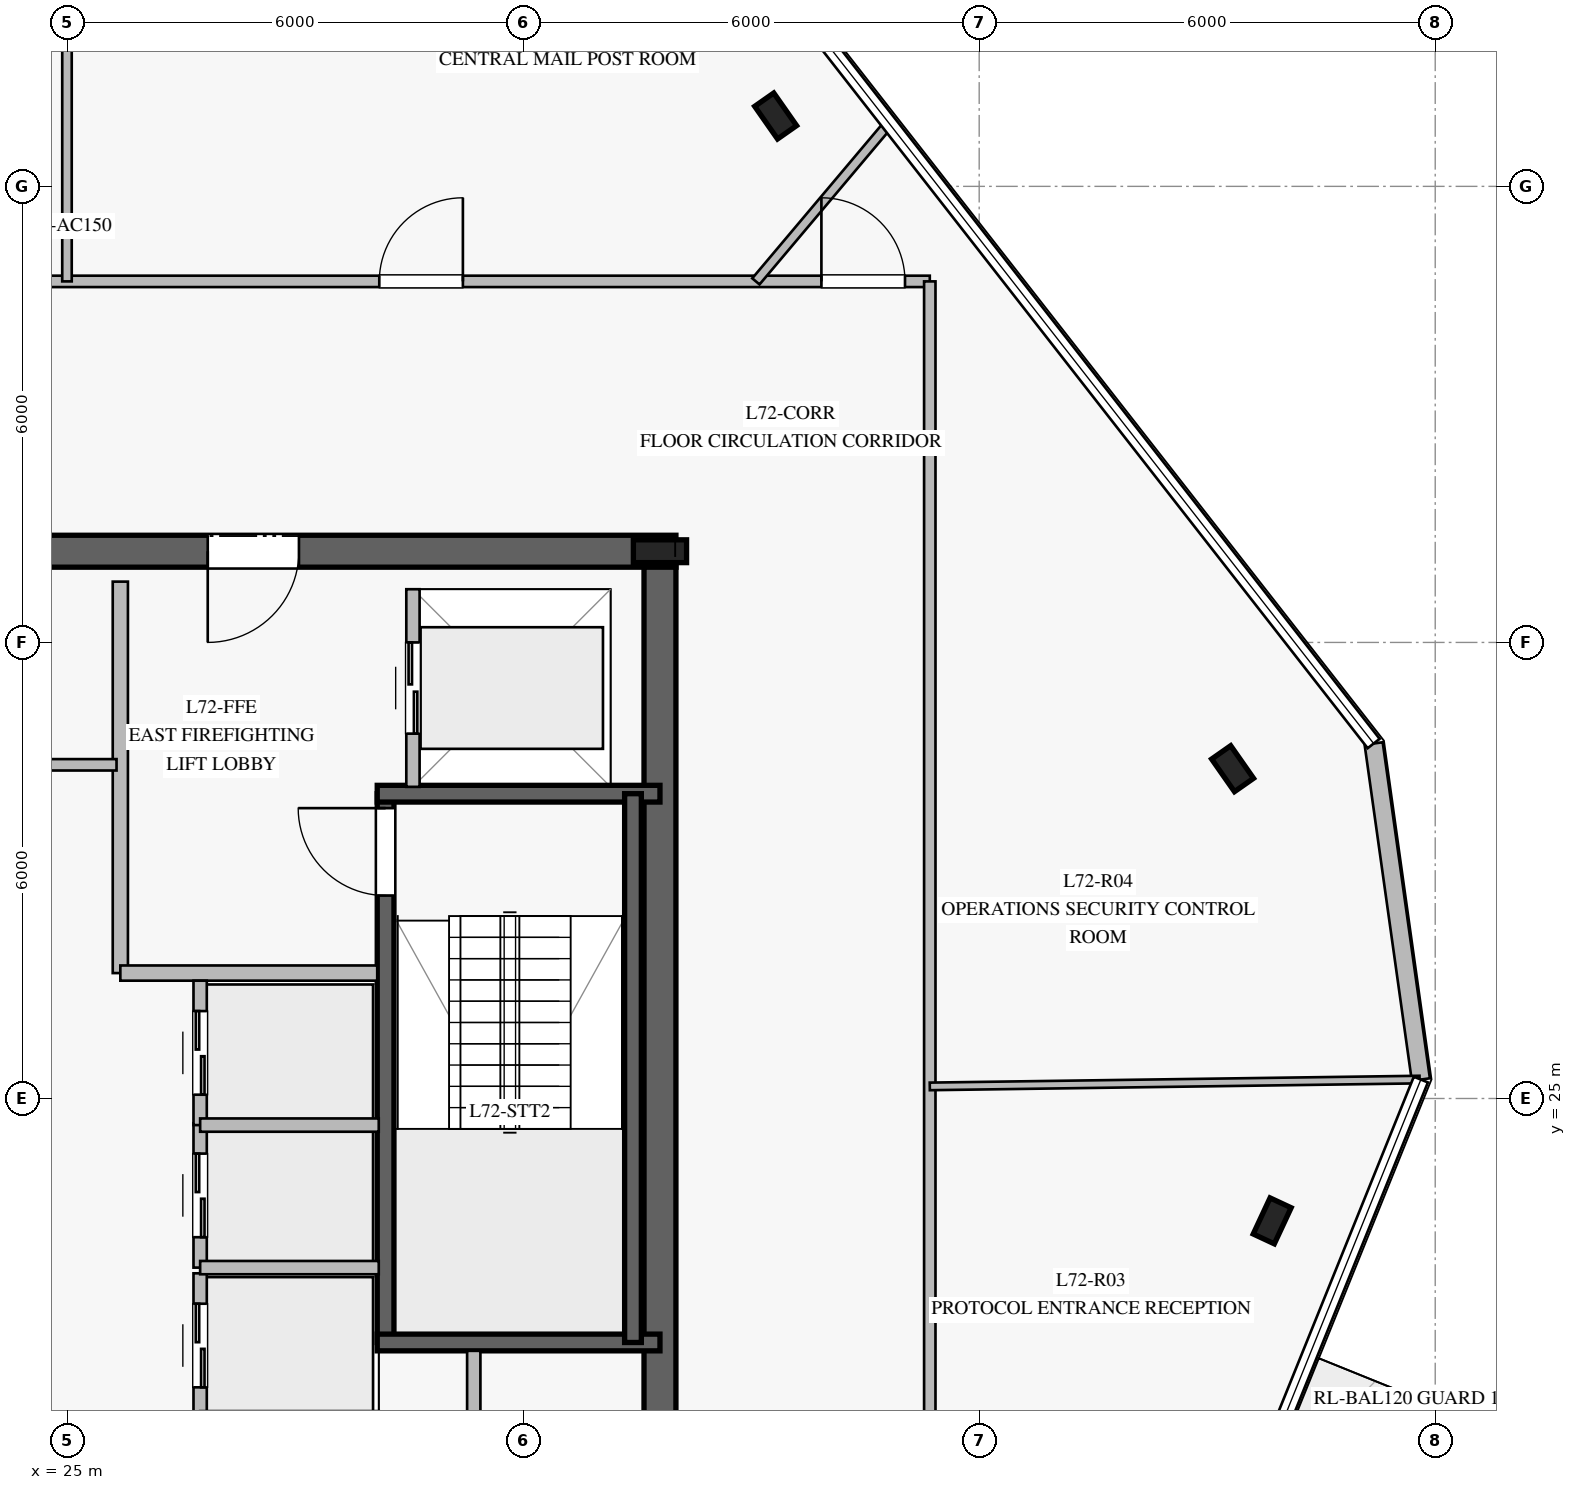
"""IFC4 building model, lengths in metres.
Left out: names, types, materials, properties, quantities, classifications, styles, units other than length and angle.
Written with IfcOpenShell. Run it as: python <this file> out.ifc"""

import sys

from ifc_helpers import new_model, si_unit, direction, frame, frame_2d, origin, origin_2d, place, context, subcontext, project, spatial, rectangle, i_section, extrude, element, fill, save


model = new_model("IFC4")
c1 = context("Model", 3, precision=1e-05, world=origin(), true_north=direction((0.0, 1.0)))
c2 = subcontext(c1, "Body", "Model", "MODEL_VIEW")
j1 = project(units=[si_unit("LENGTHUNIT", "METRE"), si_unit("PLANEANGLEUNIT", "RADIAN")], contexts=[c1])
p1 = place(None, origin())
s1 = spatial("IfcSite", under=j1, at=p1, CompositionType="ELEMENT")
p2 = place(p1, origin())
s2 = spatial("IfcBuilding", under=s1, at=p2, CompositionType="ELEMENT")
p3 = place(p2, frame((0.0, 0.0, 298.2)))
s3 = spatial("IfcBuildingStorey", under=s2, at=p3, CompositionType="ELEMENT", Elevation=298.2)
p4 = place(p3, frame((33.01, 32.2, 0.0), z_axis=(0.0, 0.0, 1.0), x_axis=(-1.0, 0.0, 0.0)))
e1 = element("IfcWall", 1, at=p4, inside=s3, PredefinedType="SHEAR", context=c2, shape_type="SweptSolid", body=[
    extrude(rectangle(XDim=16.02, YDim=0.42, at=frame_2d((8.01, 0.0))), origin(), (0.0, 0.0, 1.0), 3.78),
])
p5 = place(p4, frame((4.96, 0.0, 0.0)))
e2 = element("IfcOpeningElement", 2, at=p5, cuts=e1, PredefinedType="OPENING", context=c2, shape_type="SweptSolid", body=[
    extrude(rectangle(XDim=1.2, YDim=2.25, at=frame_2d((0.6, 1.125))), frame((0.0, 0.22, 0.0), z_axis=(0.0, -1.0, 0.0), x_axis=(1.0, 0.0, 0.0)), (0.0, 0.0, 1.0), 0.44),
])
p6 = place(p4, frame((9.785, 0.0, 0.0)))
e3 = element("IfcOpeningElement", 3, at=p6, cuts=e1, PredefinedType="OPENING", context=c2, shape_type="SweptSolid", body=[
    extrude(rectangle(XDim=1.1, YDim=2.2, at=frame_2d((0.55, 1.1))), frame((0.0, 0.22, 0.0), z_axis=(0.0, -1.0, 0.0), x_axis=(1.0, 0.0, 0.0)), (0.0, 0.0, 1.0), 0.44),
])
p7 = place(p3, frame((32.8, 18.01, 0.0), z_axis=(0.0, 0.0, 1.0), x_axis=(0.0, 1.0, 0.0)))
e4 = element("IfcWall", 4, at=p7, inside=s3, PredefinedType="SHEAR", context=c2, shape_type="SweptSolid", body=[
    extrude(rectangle(XDim=13.98, YDim=0.42, at=frame_2d((6.99, 0.0))), origin(), (0.0, 0.0, 1.0), 3.78),
])
p8 = place(p3, frame((32.8, 32.2, 0.0), z_axis=(0.0, 0.0, 1.0), x_axis=(1.0, 0.0, 0.0)))
e5 = element("IfcColumn", 5, at=p8, inside=s3, PredefinedType="COLUMN", context=c2, shape_type="SweptSolid", body=[
    extrude(i_section(OverallWidth=0.3, OverallDepth=0.7, WebThickness=0.017, FlangeThickness=0.032, at=origin_2d()), origin(), (0.0, 0.0, 1.0), 4.0),
])
p9 = place(p3, frame((29.19, 21.79, 0.0), z_axis=(0.0, 0.0, 1.0), x_axis=(0.0, 1.0, 0.0)))
e6 = element("IfcWall", 6, at=p9, inside=s3, PredefinedType="SOLIDWALL", context=c2, shape_type="SweptSolid", body=[
    extrude(rectangle(XDim=7.22, YDim=0.22, at=frame_2d((3.61, 0.0))), origin(), (0.0, 0.0, 1.0), 3.78),
])
p10 = place(p9, frame((5.88, 0.0, 0.0)))
e7 = element("IfcOpeningElement", 7, at=p10, cuts=e6, PredefinedType="OPENING", context=c2, shape_type="SweptSolid", body=[
    extrude(rectangle(XDim=1.15, YDim=2.2, at=frame_2d((0.575, 1.1))), frame((0.0, 0.12, 0.0), z_axis=(0.0, -1.0, 0.0), x_axis=(1.0, 0.0, 0.0)), (0.0, 0.0, 1.0), 0.24),
])
for number, where, z_axis, x_axis in (
    (8, (29.08, 21.79, 0.0), (0.0, 0.0, 1.0), (1.0, 0.0, 0.0)),
    (9, (29.08, 29.01, 0.0), (0.0, 0.0, 1.0), (1.0, 0.0, 0.0)),
):
    element("IfcWall", number, at=place(p3, frame(where, z_axis=z_axis, x_axis=x_axis)), inside=s3, PredefinedType="SOLIDWALL", context=c2, shape_type="SweptSolid", body=[
        extrude(rectangle(XDim=3.72, YDim=0.22, at=frame_2d((1.86, 0.0))), origin(), (0.0, 0.0, 1.0), 3.78),
    ])
p11 = place(p3, frame((32.445, 29.01, 0.0), z_axis=(0.0, 0.0, 1.0), x_axis=(0.0, -1.0, 0.0)))
e10 = element("IfcWall", 10, at=p11, inside=s3, PredefinedType="SOLIDWALL", context=c2, shape_type="SweptSolid", body=[
    extrude(rectangle(XDim=7.22, YDim=0.22, at=frame_2d((3.61, 0.0))), origin(), (0.0, 0.0, 1.0), 3.78),
])
for number, where, z_axis, x_axis in (
    (11, (40.855, 23.39, 0.0), (0.0, 0.0, 1.0), (0.423, 0.906, 0.0)),
    (12, (40.334, 29.339, 0.0), (0.0, 0.0, 1.0), (-0.574, 0.819, 0.0)),
    (13, (34.322, 37.926, 0.0), (0.0, 0.0, 1.0), (-0.574, 0.819, 0.0)),
):
    element("IfcColumn", number, at=place(p3, frame(where, z_axis=z_axis, x_axis=x_axis)), inside=s3, PredefinedType="COLUMN", context=c2, shape_type="SweptSolid", body=[
        extrude(i_section(OverallWidth=0.306, OverallDepth=0.524, WebThickness=0.021, FlangeThickness=0.04, at=origin_2d()), origin(), (0.0, 0.0, 1.0), 4.0),
    ])
p12 = place(p3, frame((42.811, 25.249, 0.0), z_axis=(0.0, 0.0, 1.0), x_axis=(-0.139124115192, 0.990274952007, 0.0)))
e14 = element("IfcWall", 14, at=p12, inside=s3, PredefinedType="STANDARD", context=c2, shape_type="SweptSolid", body=[
    extrude(rectangle(XDim=4.464, YDim=0.24, at=frame_2d((2.232, 0.0))), origin(), (0.0, 0.0, 1.0), 3.78),
])
p13 = place(p3, frame((25.7, 26.65, 0.0), z_axis=(0.0, 0.0, 1.0), x_axis=(0.0, 1.0, 0.0)))
e15 = element("IfcWall", 15, at=p13, inside=s3, PredefinedType="PARTITIONING", context=c2, shape_type="SweptSolid", body=[
    extrude(rectangle(XDim=5.15, YDim=0.2, at=frame_2d((2.575, 0.0))), origin(), (0.0, 0.0, 1.0), 3.78),
])
p14 = place(p3, frame((25.7, 26.65, 0.0), z_axis=(0.0, 0.0, 1.0), x_axis=(1.0, 0.0, 0.0)))
e16 = element("IfcWall", 16, at=p14, inside=s3, PredefinedType="PARTITIONING", context=c2, shape_type="SweptSolid", body=[
    extrude(rectangle(XDim=3.38, YDim=0.2, at=frame_2d((1.69, 0.0))), origin(), (0.0, 0.0, 1.0), 3.78),
])
p15 = place(p3, frame((30.35, 18.2, 0.0), z_axis=(0.0, 0.0, 1.0), x_axis=(0.0, 1.0, 0.0)))
e17 = element("IfcWall", 17, at=p15, inside=s3, PredefinedType="PARTITIONING", context=c2, shape_type="SweptSolid", body=[
    extrude(rectangle(XDim=3.48, YDim=0.175, at=frame_2d((1.74, 0.0))), origin(), (0.0, 0.0, 1.0), 3.78),
])
p16 = place(p3, frame((19.75, 29.39, 0.0), z_axis=(0.0, 0.0, 1.0), x_axis=(1.0, 0.0, 0.0)))
e18 = element("IfcWall", 18, at=p16, inside=s3, PredefinedType="PARTITIONING", context=c2, shape_type="SweptSolid", body=[
    extrude(rectangle(XDim=5.9, YDim=0.15, at=frame_2d((2.95, 0.0))), origin(), (0.0, 0.0, 1.0), 3.78),
])
p17 = place(p3, frame((26.75, 20.8, 0.0), z_axis=(0.0, 0.0, 1.0), x_axis=(0.0, 1.0, 0.0)))
e19 = element("IfcWall", 19, at=p17, inside=s3, PredefinedType="PARTITIONING", context=c2, shape_type="SweptSolid", body=[
    extrude(rectangle(XDim=1.9, YDim=0.175, at=frame_2d((0.95, 0.0))), origin(), (0.0, 0.0, 1.0), 3.78),
])
p18 = place(p17, frame((0.4, 0.0, 0.0)))
e20 = element("IfcOpeningElement", 20, at=p18, cuts=e19, PredefinedType="OPENING", context=c2, shape_type="SweptSolid", body=[
    extrude(rectangle(XDim=1.1, YDim=2.2, at=frame_2d((0.55, 1.1))), frame((0.0, 0.098, 0.0), z_axis=(0.0, -1.0, 0.0), x_axis=(1.0, 0.0, 0.0)), (0.0, 0.0, 1.0), 0.195),
])
p19 = place(p3, frame((26.75, 22.775, 0.0), z_axis=(0.0, 0.0, 1.0), x_axis=(0.0, 1.0, 0.0)))
e21 = element("IfcWall", 21, at=p19, inside=s3, PredefinedType="PARTITIONING", context=c2, shape_type="SweptSolid", body=[
    extrude(rectangle(XDim=1.9, YDim=0.175, at=frame_2d((0.95, 0.0))), origin(), (0.0, 0.0, 1.0), 3.78),
])
p20 = place(p19, frame((0.4, 0.0, 0.0)))
e22 = element("IfcOpeningElement", 22, at=p20, cuts=e21, PredefinedType="OPENING", context=c2, shape_type="SweptSolid", body=[
    extrude(rectangle(XDim=1.1, YDim=2.2, at=frame_2d((0.55, 1.1))), frame((0.0, 0.098, 0.0), z_axis=(0.0, -1.0, 0.0), x_axis=(1.0, 0.0, 0.0)), (0.0, 0.0, 1.0), 0.195),
])
p21 = place(p3, frame((26.75, 22.775, 0.0), z_axis=(0.0, 0.0, 1.0), x_axis=(1.0, 0.0, 0.0)))
e23 = element("IfcWall", 23, at=p21, inside=s3, PredefinedType="PARTITIONING", context=c2, shape_type="SweptSolid", body=[
    extrude(rectangle(XDim=2.35, YDim=0.175, at=frame_2d((1.175, 0.0))), origin(), (0.0, 0.0, 1.0), 3.78),
])
p22 = place(p3, frame((26.75, 24.65, 0.0), z_axis=(0.0, 0.0, 1.0), x_axis=(0.0, 1.0, 0.0)))
e24 = element("IfcWall", 24, at=p22, inside=s3, PredefinedType="PARTITIONING", context=c2, shape_type="SweptSolid", body=[
    extrude(rectangle(XDim=1.9, YDim=0.175, at=frame_2d((0.95, 0.0))), origin(), (0.0, 0.0, 1.0), 3.78),
])
p23 = place(p22, frame((0.4, 0.0, 0.0)))
e25 = element("IfcOpeningElement", 25, at=p23, cuts=e24, PredefinedType="OPENING", context=c2, shape_type="SweptSolid", body=[
    extrude(rectangle(XDim=1.1, YDim=2.2, at=frame_2d((0.55, 1.1))), frame((0.0, 0.098, 0.0), z_axis=(0.0, -1.0, 0.0), x_axis=(1.0, 0.0, 0.0)), (0.0, 0.0, 1.0), 0.195),
])
p24 = place(p3, frame((26.75, 24.65, 0.0), z_axis=(0.0, 0.0, 1.0), x_axis=(1.0, 0.0, 0.0)))
e26 = element("IfcWall", 26, at=p24, inside=s3, PredefinedType="PARTITIONING", context=c2, shape_type="SweptSolid", body=[
    extrude(rectangle(XDim=2.35, YDim=0.175, at=frame_2d((1.175, 0.0))), origin(), (0.0, 0.0, 1.0), 3.78),
])
p25 = place(p3, frame((29.55, 29.1, 0.0), z_axis=(0.0, 0.0, 1.0), x_axis=(0.0, 1.0, 0.0)))
e27 = element("IfcWall", 27, at=p25, inside=s3, PredefinedType="PARTITIONING", context=c2, shape_type="SweptSolid", body=[
    extrude(rectangle(XDim=2.6, YDim=0.175, at=frame_2d((1.3, 0.0))), origin(), (0.0, 0.0, 1.0), 3.78),
])
p26 = place(p25, frame((0.7, 0.0, 0.0)))
e28 = element("IfcOpeningElement", 28, at=p26, cuts=e27, PredefinedType="OPENING", context=c2, shape_type="SweptSolid", body=[
    extrude(rectangle(XDim=1.2, YDim=2.2, at=frame_2d((0.6, 1.1))), frame((0.0, 0.098, 0.0), z_axis=(0.0, -1.0, 0.0), x_axis=(1.0, 0.0, 0.0)), (0.0, 0.0, 1.0), 0.195),
])
p27 = place(p3, frame((13.65, 35.75, 0.0), z_axis=(0.0, 0.0, 1.0), x_axis=(1.0, 0.0, 0.0)))
e29 = element("IfcWall", 29, at=p27, inside=s3, PredefinedType="PARTITIONING", context=c2, shape_type="SweptSolid", body=[
    extrude(rectangle(XDim=22.7, YDim=0.15, at=frame_2d((11.35, 0.0))), origin(), (0.0, 0.0, 1.0), 3.28),
])
p28 = place(p27, frame((21.274, 0.0, 0.0)))
e30 = element("IfcOpeningElement", 30, at=p28, cuts=e29, PredefinedType="OPENING", context=c2, shape_type="SweptSolid", body=[
    extrude(rectangle(XDim=1.1, YDim=2.2, at=frame_2d((0.55, 1.1))), frame((0.0, 0.085, 0.0), z_axis=(0.0, -1.0, 0.0), x_axis=(1.0, 0.0, 0.0)), (0.0, 0.0, 1.0), 0.17),
])
p29 = place(p27, frame((15.457, 0.0, 0.0)))
e31 = element("IfcOpeningElement", 31, at=p29, cuts=e29, PredefinedType="OPENING", context=c2, shape_type="SweptSolid", body=[
    extrude(rectangle(XDim=1.1, YDim=2.2, at=frame_2d((0.55, 1.1))), frame((0.0, 0.085, 0.0), z_axis=(0.0, -1.0, 0.0), x_axis=(1.0, 0.0, 0.0)), (0.0, 0.0, 1.0), 0.17),
])
p30 = place(p27, frame((5.308, 0.0, 0.0)))
e32 = element("IfcOpeningElement", 32, at=p30, cuts=e29, PredefinedType="OPENING", context=c2, shape_type="SweptSolid", body=[
    extrude(rectangle(XDim=1.1, YDim=2.2, at=frame_2d((0.55, 1.1))), frame((0.0, 0.085, 0.0), z_axis=(0.0, -1.0, 0.0), x_axis=(1.0, 0.0, 0.0)), (0.0, 0.0, 1.0), 0.17),
])
p31 = place(p3, frame((36.35, 35.75, 0.0), z_axis=(0.0, 0.0, 1.0), x_axis=(0.0, -1.0, 0.0)))
e33 = element("IfcWall", 33, at=p31, inside=s3, PredefinedType="PARTITIONING", context=c2, shape_type="SweptSolid", body=[
    extrude(rectangle(XDim=21.5, YDim=0.15, at=frame_2d((10.75, 0.0))), origin(), (0.0, 0.0, 1.0), 3.25),
])
p32 = place(p31, frame((15.222, 0.0, 0.0)))
e34 = element("IfcOpeningElement", 34, at=p32, cuts=e33, PredefinedType="OPENING", context=c2, shape_type="SweptSolid", body=[
    extrude(rectangle(XDim=1.1, YDim=2.2, at=frame_2d((0.55, 1.1))), frame((0.0, 0.085, 0.0), z_axis=(0.0, -1.0, 0.0), x_axis=(1.0, 0.0, 0.0)), (0.0, 0.0, 1.0), 0.17),
])
p33 = place(p3, frame((24.998, 35.75, 0.0), z_axis=(0.0, 0.0, 1.0), x_axis=(0.0, 1.0, 0.0)))
e35 = element("IfcWall", 35, at=p33, inside=s3, PredefinedType="PARTITIONING", context=c2, shape_type="SweptSolid", body=[
    extrude(rectangle(XDim=5.816, YDim=0.125, at=frame_2d((2.908, 0.0))), origin(), (0.0, 0.0, 1.0), 3.28),
])
p34 = place(p3, frame((36.35, 25.159, 0.0), z_axis=(0.0, 0.0, 1.0), x_axis=(0.999902287831, 0.013979084042, 0.0)))
e36 = element("IfcWall", 36, at=p34, inside=s3, PredefinedType="MOVABLE", context=c2, shape_type="SweptSolid", body=[
    extrude(rectangle(XDim=6.445, YDim=0.1, at=frame_2d((3.222, 0.0))), origin(), (0.0, 0.0, 1.0), 3.28),
])
p35 = place(p3, frame((34.062, 35.75, 0.0), z_axis=(0.0, 0.0, 1.0), x_axis=(0.644438862716, 0.764655839068, 0.0)))
e37 = element("IfcWall", 37, at=p35, inside=s3, PredefinedType="PARTITIONING", context=c2, shape_type="SweptSolid", body=[
    extrude(rectangle(XDim=2.703, YDim=0.125, at=frame_2d((1.352, 0.0))), origin(), (0.0, 0.0, 1.0), 3.28),
])
p36 = place(p10, origin())
e38 = element("IfcDoor", 38, at=p36, inside=s3, OperationType="SINGLE_SWING_RIGHT", PredefinedType="DOOR", context=c2, shape_type="SweptSolid", body=[
    extrude(rectangle(XDim=1.15, YDim=2.2, at=frame_2d((0.575, 1.1))), frame((0.0, 0.025, 0.0), z_axis=(0.0, -1.0, 0.0), x_axis=(1.0, 0.0, 0.0)), (0.0, 0.0, 1.0), 0.05),
])
fill(e7, e38)
p37 = place(p5, origin())
e39 = element("IfcDoor", 39, at=p37, inside=s3, OperationType="SINGLE_SWING_RIGHT", PredefinedType="DOOR", context=c2, shape_type="SweptSolid", body=[
    extrude(rectangle(XDim=1.2, YDim=2.25, at=frame_2d((0.6, 1.125))), frame((0.0, 0.025, 0.0), z_axis=(0.0, -1.0, 0.0), x_axis=(1.0, 0.0, 0.0)), (0.0, 0.0, 1.0), 0.05),
])
fill(e2, e39)
p38 = place(p18, origin())
e40 = element("IfcDoor", 40, at=p38, inside=s3, OperationType="DOUBLE_DOOR_SLIDING", PredefinedType="DOOR", context=c2, shape_type="SweptSolid", body=[
    extrude(rectangle(XDim=1.1, YDim=2.2, at=frame_2d((0.55, 1.1))), frame((0.0, 0.025, 0.0), z_axis=(0.0, -1.0, 0.0), x_axis=(1.0, 0.0, 0.0)), (0.0, 0.0, 1.0), 0.05),
])
fill(e20, e40)
p39 = place(p20, origin())
e41 = element("IfcDoor", 41, at=p39, inside=s3, OperationType="DOUBLE_DOOR_SLIDING", PredefinedType="DOOR", context=c2, shape_type="SweptSolid", body=[
    extrude(rectangle(XDim=1.1, YDim=2.2, at=frame_2d((0.55, 1.1))), frame((0.0, 0.025, 0.0), z_axis=(0.0, -1.0, 0.0), x_axis=(1.0, 0.0, 0.0)), (0.0, 0.0, 1.0), 0.05),
])
fill(e22, e41)
p40 = place(p23, origin())
e42 = element("IfcDoor", 42, at=p40, inside=s3, OperationType="DOUBLE_DOOR_SLIDING", PredefinedType="DOOR", context=c2, shape_type="SweptSolid", body=[
    extrude(rectangle(XDim=1.1, YDim=2.2, at=frame_2d((0.55, 1.1))), frame((0.0, 0.025, 0.0), z_axis=(0.0, -1.0, 0.0), x_axis=(1.0, 0.0, 0.0)), (0.0, 0.0, 1.0), 0.05),
])
fill(e25, e42)
p41 = place(p26, origin())
e43 = element("IfcDoor", 43, at=p41, inside=s3, OperationType="DOUBLE_DOOR_SLIDING", PredefinedType="DOOR", context=c2, shape_type="SweptSolid", body=[
    extrude(rectangle(XDim=1.2, YDim=2.2, at=frame_2d((0.6, 1.1))), frame((0.0, 0.025, 0.0), z_axis=(0.0, -1.0, 0.0), x_axis=(1.0, 0.0, 0.0)), (0.0, 0.0, 1.0), 0.05),
])
fill(e28, e43)
p42 = place(p28, origin())
e44 = element("IfcDoor", 44, at=p42, inside=s3, OperationType="SINGLE_SWING_LEFT", PredefinedType="DOOR", context=c2, shape_type="SweptSolid", body=[
    extrude(rectangle(XDim=1.1, YDim=2.2, at=frame_2d((0.55, 1.1))), frame((0.0, 0.025, 0.0), z_axis=(0.0, -1.0, 0.0), x_axis=(1.0, 0.0, 0.0)), (0.0, 0.0, 1.0), 0.05),
])
fill(e30, e44)
p43 = place(p29, origin())
e45 = element("IfcDoor", 45, at=p43, inside=s3, OperationType="SINGLE_SWING_RIGHT", PredefinedType="DOOR", context=c2, shape_type="SweptSolid", body=[
    extrude(rectangle(XDim=1.1, YDim=2.2, at=frame_2d((0.55, 1.1))), frame((0.0, 0.025, 0.0), z_axis=(0.0, -1.0, 0.0), x_axis=(1.0, 0.0, 0.0)), (0.0, 0.0, 1.0), 0.05),
])
fill(e31, e45)
save(model, sys.argv[1])
